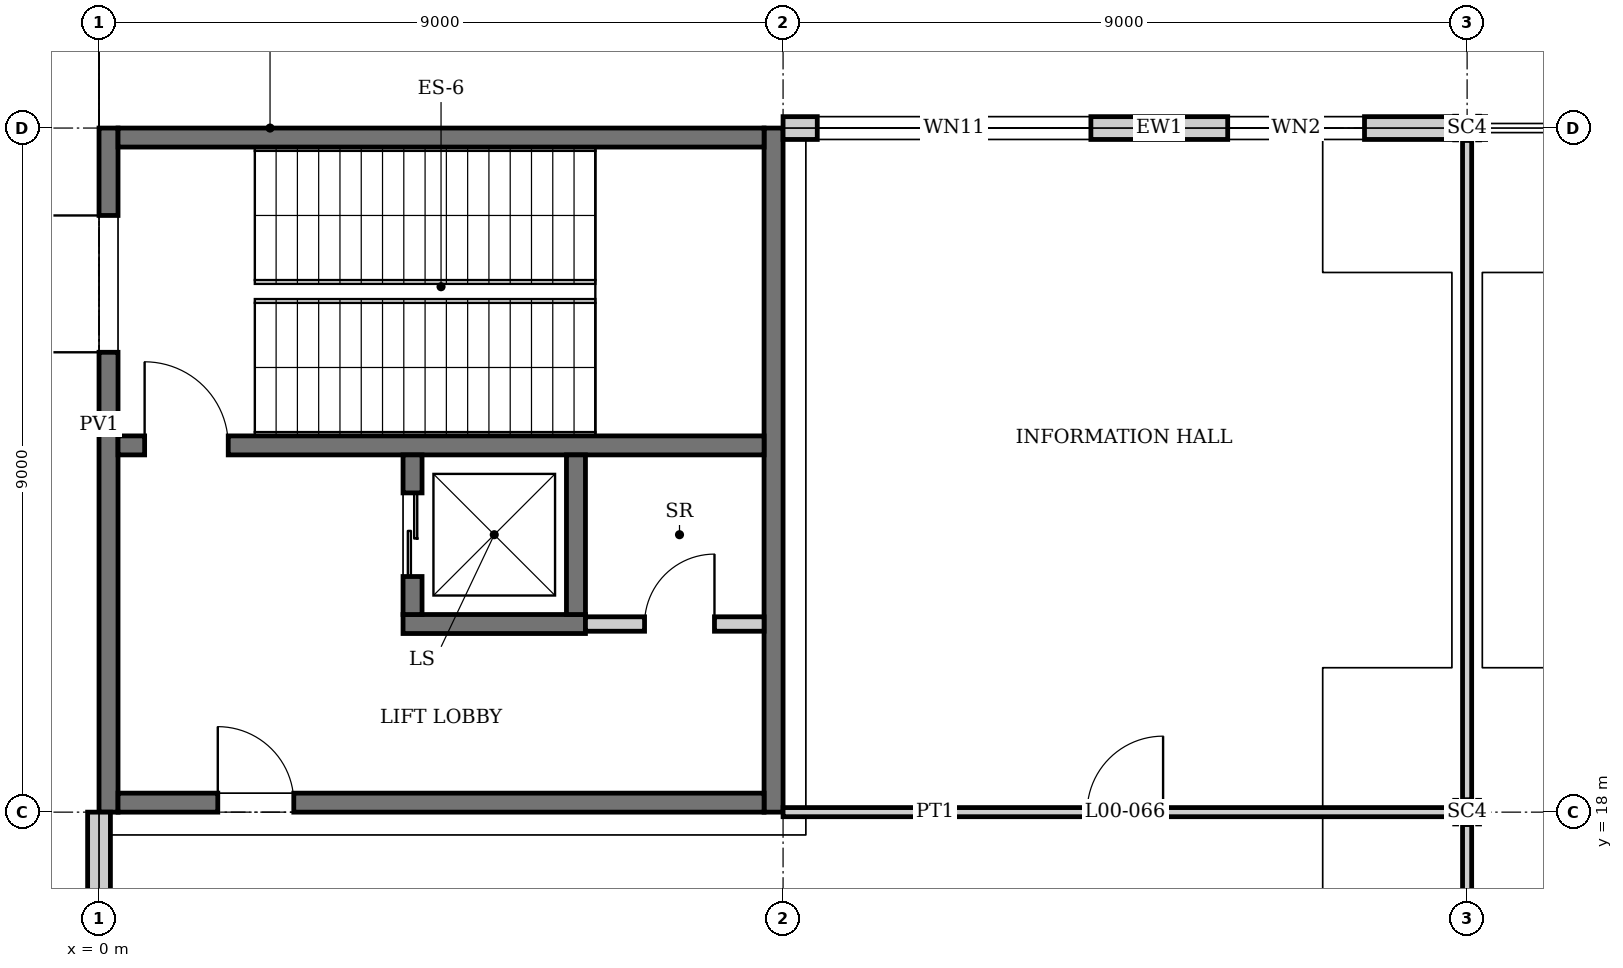
"""IFC4 building model, lengths in metres.
Left out: names, types, materials, properties, quantities, classifications, styles, units other than length and angle.
Written with IfcOpenShell. Run it as: python <this file> out.ifc"""

import sys

from ifc_helpers import new_model, si_unit, direction, frame, frame_2d, origin, origin_2d, place, context, subcontext, project, spatial, rectangle, i_section, extrude, element, fill, save


model = new_model("IFC4")
c1 = context("Model", 3, precision=1e-05, world=origin(), true_north=direction((0.0, 1.0)))
c2 = subcontext(c1, "Body", "Model", "MODEL_VIEW")
j1 = project(units=[si_unit("LENGTHUNIT", "METRE"), si_unit("PLANEANGLEUNIT", "RADIAN")], contexts=[c1])
p1 = place(None, origin())
s1 = spatial("IfcSite", under=j1, at=p1, CompositionType="ELEMENT")
p2 = place(p1, origin())
s2 = spatial("IfcBuilding", under=s1, at=p2, CompositionType="ELEMENT")
p3 = place(p2, origin())
s3 = spatial("IfcBuildingStorey", under=s2, at=p3, CompositionType="ELEMENT", Elevation=0.0)
for number, where, z_axis, x_axis in (
    (1, (18.0, 18.0, 0.0), (0.0, 0.0, 1.0), (0.0, 1.0, 0.0)),
    (2, (18.0, 27.0, 0.0), (0.0, 0.0, 1.0), (0.0, 1.0, 0.0)),
):
    element("IfcColumn", number, at=place(p3, frame(where, z_axis=z_axis, x_axis=x_axis)), inside=s3, PredefinedType="COLUMN", context=c2, shape_type="SweptSolid", body=[
        extrude(i_section(OverallWidth=0.311, OverallDepth=0.327, WebThickness=0.016, FlangeThickness=0.025, at=origin_2d()), origin(), (0.0, 0.0, 1.0), 6.0),
    ])
p4 = place(p3, frame((0.125, 18.0, 0.0), z_axis=(0.0, 0.0, 1.0), x_axis=(0.0, 1.0, 0.0)))
e3 = element("IfcWall", 3, at=p4, inside=s3, PredefinedType="SHEAR", context=c2, shape_type="SweptSolid", body=[
    extrude(rectangle(XDim=9.0, YDim=0.25, at=frame_2d((4.5, 0.0))), origin(), (0.0, 0.0, 1.0), 6.0),
])
p5 = place(p4, frame((6.05, 0.0, 0.0)))
e4 = element("IfcOpeningElement", 4, at=p5, cuts=e3, PredefinedType="OPENING", context=c2, shape_type="SweptSolid", body=[
    extrude(rectangle(XDim=1.8, YDim=2.4, at=frame_2d((0.9, 1.2))), frame((0.0, 0.135, 0.0), z_axis=(0.0, -1.0, 0.0), x_axis=(1.0, 0.0, 0.0)), (0.0, 0.0, 1.0), 0.27),
])
p6 = place(p3, frame((8.875, 18.0, 0.0), z_axis=(0.0, 0.0, 1.0), x_axis=(0.0, 1.0, 0.0)))
e5 = element("IfcWall", 5, at=p6, inside=s3, PredefinedType="SHEAR", context=c2, shape_type="SweptSolid", body=[
    extrude(rectangle(XDim=9.0, YDim=0.25, at=frame_2d((4.5, 0.0))), origin(), (0.0, 0.0, 1.0), 6.0),
])
p7 = place(p3, frame((0.25, 18.125, 0.0), z_axis=(0.0, 0.0, 1.0), x_axis=(1.0, 0.0, 0.0)))
e6 = element("IfcWall", 6, at=p7, inside=s3, PredefinedType="SHEAR", context=c2, shape_type="SweptSolid", body=[
    extrude(rectangle(XDim=8.5, YDim=0.25, at=frame_2d((4.25, 0.0))), origin(), (0.0, 0.0, 1.0), 6.0),
])
p8 = place(p7, frame((1.312, 0.0, 0.0)))
e7 = element("IfcOpeningElement", 7, at=p8, cuts=e6, PredefinedType="OPENING", context=c2, shape_type="SweptSolid", body=[
    extrude(rectangle(XDim=1.0, YDim=2.1, at=frame_2d((0.5, 1.05))), frame((0.0, 0.135, 0.0), z_axis=(0.0, -1.0, 0.0), x_axis=(1.0, 0.0, 0.0)), (0.0, 0.0, 1.0), 0.27),
])
p9 = place(p3, frame((0.25, 26.875, 0.0), z_axis=(0.0, 0.0, 1.0), x_axis=(1.0, 0.0, 0.0)))
e8 = element("IfcWall", 8, at=p9, inside=s3, PredefinedType="SHEAR", context=c2, shape_type="SweptSolid", body=[
    extrude(rectangle(XDim=8.5, YDim=0.25, at=frame_2d((4.25, 0.0))), origin(), (0.0, 0.0, 1.0), 6.0),
])
p10 = place(p3, frame((9.0, 27.0, 0.0), z_axis=(0.0, 0.0, 1.0), x_axis=(1.0, 0.0, 0.0)))
e9 = element("IfcWall", 9, at=p10, inside=s3, PredefinedType="SOLIDWALL", context=c2, shape_type="SweptSolid", body=[
    extrude(rectangle(XDim=8.836, YDim=0.3, at=frame_2d((4.418, 0.0))), origin(), (0.0, 0.0, 1.0), 5.444),
])
p11 = place(p10, frame((0.45, 0.0, 0.3)))
e10 = element("IfcOpeningElement", 10, at=p11, cuts=e9, PredefinedType="OPENING", context=c2, shape_type="SweptSolid", body=[
    extrude(rectangle(XDim=3.6, YDim=3.0, at=frame_2d((1.8, 1.5))), frame((0.0, 0.16, 0.0), z_axis=(0.0, -1.0, 0.0), x_axis=(1.0, 0.0, 0.0)), (0.0, 0.0, 1.0), 0.32),
])
p12 = place(p10, frame((5.85, 0.0, 0.6)))
e11 = element("IfcOpeningElement", 11, at=p12, cuts=e9, PredefinedType="OPENING", context=c2, shape_type="SweptSolid", body=[
    extrude(rectangle(XDim=1.8, YDim=3.0, at=frame_2d((0.9, 1.5))), frame((0.0, 0.16, 0.0), z_axis=(0.0, -1.0, 0.0), x_axis=(1.0, 0.0, 0.0)), (0.0, 0.0, 1.0), 0.32),
])
p13 = place(p3, frame((0.0, 9.154, 0.0), z_axis=(0.0, 0.0, 1.0), x_axis=(0.0, 1.0, 0.0)))
e12 = element("IfcWall", 12, at=p13, inside=s3, PredefinedType="SOLIDWALL", context=c2, shape_type="SweptSolid", body=[
    extrude(rectangle(XDim=8.846, YDim=0.3, at=frame_2d((4.423, 0.0))), origin(), (0.0, 0.0, 1.0), 5.444),
])
p14 = place(p13, frame((0.896, 0.0, 0.0)))
e13 = element("IfcOpeningElement", 13, at=p14, cuts=e12, PredefinedType="OPENING", context=c2, shape_type="SweptSolid", body=[
    extrude(rectangle(XDim=2.4, YDim=2.7, at=frame_2d((1.2, 1.35))), frame((0.0, 0.16, 0.0), z_axis=(0.0, -1.0, 0.0), x_axis=(1.0, 0.0, 0.0)), (0.0, 0.0, 1.0), 0.32),
])
p15 = place(p13, frame((5.396, 0.0, 0.0)))
e14 = element("IfcOpeningElement", 14, at=p15, cuts=e12, PredefinedType="OPENING", context=c2, shape_type="SweptSolid", body=[
    extrude(rectangle(XDim=2.4, YDim=2.7, at=frame_2d((1.2, 1.35))), frame((0.0, 0.16, 0.0), z_axis=(0.0, -1.0, 0.0), x_axis=(1.0, 0.0, 0.0)), (0.0, 0.0, 1.0), 0.32),
])
p16 = place(p3, frame((0.25, 22.825, 0.0), z_axis=(0.0, 0.0, 1.0), x_axis=(1.0, 0.0, 0.0)))
e15 = element("IfcWall", 15, at=p16, inside=s3, PredefinedType="SOLIDWALL", context=c2, shape_type="SweptSolid", body=[
    extrude(rectangle(XDim=8.5, YDim=0.25, at=frame_2d((4.25, 0.0))), origin(), (0.0, 0.0, 1.0), 5.75),
])
p17 = place(p16, frame((0.35, 0.0, 0.0)))
e16 = element("IfcOpeningElement", 16, at=p17, cuts=e15, PredefinedType="OPENING", context=c2, shape_type="SweptSolid", body=[
    extrude(rectangle(XDim=1.1, YDim=2.1, at=frame_2d((0.55, 1.05))), frame((0.0, 0.135, 0.0), z_axis=(0.0, -1.0, 0.0), x_axis=(1.0, 0.0, 0.0)), (0.0, 0.0, 1.0), 0.27),
])
p18 = place(p3, frame((4.0, 20.475, -1.4), z_axis=(0.0, 0.0, 1.0), x_axis=(1.0, 0.0, 0.0)))
e17 = element("IfcWall", 17, at=p18, inside=s3, PredefinedType="SOLIDWALL", context=c2, shape_type="SweptSolid", body=[
    extrude(rectangle(XDim=2.4, YDim=0.25, at=frame_2d((1.2, 0.0))), origin(), (0.0, 0.0, 1.0), 7.4),
])
p19 = place(p3, frame((4.125, 20.6, -1.4), z_axis=(0.0, 0.0, 1.0), x_axis=(0.0, 1.0, 0.0)))
e18 = element("IfcWall", 18, at=p19, inside=s3, PredefinedType="SOLIDWALL", context=c2, shape_type="SweptSolid", body=[
    extrude(rectangle(XDim=2.1, YDim=0.25, at=frame_2d((1.05, 0.0))), origin(), (0.0, 0.0, 1.0), 7.4),
])
p20 = place(p19, frame((0.5, 0.0, 1.4)))
e19 = element("IfcOpeningElement", 19, at=p20, cuts=e18, PredefinedType="OPENING", context=c2, shape_type="SweptSolid", body=[
    extrude(rectangle(XDim=1.1, YDim=2.1, at=frame_2d((0.55, 1.05))), frame((0.0, 0.135, 0.0), z_axis=(0.0, -1.0, 0.0), x_axis=(1.0, 0.0, 0.0)), (0.0, 0.0, 1.0), 0.27),
])
p21 = place(p3, frame((6.275, 20.6, -1.4), z_axis=(0.0, 0.0, 1.0), x_axis=(0.0, 1.0, 0.0)))
e20 = element("IfcWall", 20, at=p21, inside=s3, PredefinedType="SOLIDWALL", context=c2, shape_type="SweptSolid", body=[
    extrude(rectangle(XDim=2.1, YDim=0.25, at=frame_2d((1.05, 0.0))), origin(), (0.0, 0.0, 1.0), 7.4),
])
p22 = place(p3, frame((9.0, 18.0, 0.0), z_axis=(0.0, 0.0, 1.0), x_axis=(1.0, 0.0, 0.0)))
e21 = element("IfcWall", 21, at=p22, inside=s3, PredefinedType="PARTITIONING", context=c2, shape_type="SweptSolid", body=[
    extrude(rectangle(XDim=8.836, YDim=0.12, at=frame_2d((4.418, 0.0))), origin(), (0.0, 0.0, 1.0), 5.322),
])
p23 = place(p22, frame((4.0, 0.0, 0.0)))
e22 = element("IfcOpeningElement", 22, at=p23, cuts=e21, PredefinedType="OPENING", context=c2, shape_type="SweptSolid", body=[
    extrude(rectangle(XDim=1.0, YDim=2.1, at=frame_2d((0.5, 1.05))), frame((0.0, 0.07, 0.0), z_axis=(0.0, -1.0, 0.0), x_axis=(1.0, 0.0, 0.0)), (0.0, 0.0, 1.0), 0.14),
])
p24 = place(p3, frame((6.4, 20.475, 0.0), z_axis=(0.0, 0.0, 1.0), x_axis=(1.0, 0.0, 0.0)))
e23 = element("IfcWall", 23, at=p24, inside=s3, PredefinedType="PARTITIONING", context=c2, shape_type="SweptSolid", body=[
    extrude(rectangle(XDim=2.35, YDim=0.19, at=frame_2d((1.175, 0.0))), origin(), (0.0, 0.0, 1.0), 5.75),
])
p25 = place(p24, frame((0.778, 0.0, 0.0)))
e24 = element("IfcOpeningElement", 24, at=p25, cuts=e23, PredefinedType="OPENING", context=c2, shape_type="SweptSolid", body=[
    extrude(rectangle(XDim=0.92, YDim=2.1, at=frame_2d((0.46, 1.05))), frame((0.0, 0.105, 0.0), z_axis=(0.0, -1.0, 0.0), x_axis=(1.0, 0.0, 0.0)), (0.0, 0.0, 1.0), 0.21),
])
p26 = place(p3, frame((18.0, 9.0, 0.0), z_axis=(0.0, 0.0, 1.0), x_axis=(0.0, 1.0, 0.0)))
e25 = element("IfcWall", 25, at=p26, inside=s3, PredefinedType="PARTITIONING", context=c2, shape_type="SweptSolid", body=[
    extrude(rectangle(XDim=8.836, YDim=0.12, at=frame_2d((4.418, 0.0))), origin(), (0.0, 0.0, 1.0), 5.444),
])
p27 = place(p26, frame((3.3, 0.0, 0.0)))
e26 = element("IfcOpeningElement", 26, at=p27, cuts=e25, PredefinedType="OPENING", context=c2, shape_type="SweptSolid", body=[
    extrude(rectangle(XDim=2.4, YDim=2.4, at=frame_2d((1.2, 1.2))), frame((0.0, 0.07, 0.0), z_axis=(0.0, -1.0, 0.0), x_axis=(1.0, 0.0, 0.0)), (0.0, 0.0, 1.0), 0.14),
])
p28 = place(p3, frame((18.0, 18.164, 0.0), z_axis=(0.0, 0.0, 1.0), x_axis=(0.0, 1.0, 0.0)))
e27 = element("IfcWall", 27, at=p28, inside=s3, PredefinedType="PARTITIONING", context=c2, shape_type="SweptSolid", body=[
    extrude(rectangle(XDim=8.673, YDim=0.12, at=frame_2d((4.336, 0.0))), origin(), (0.0, 0.0, 1.0), 5.444),
])
p29 = place(p11, origin())
e28 = element("IfcWindow", 28, at=p29, inside=s3, PartitioningType="SINGLE_PANEL", PredefinedType="WINDOW", context=c2, shape_type="SweptSolid", body=[
    extrude(rectangle(XDim=3.6, YDim=3.0, at=frame_2d((1.8, 1.5))), frame((0.0, 0.03, 0.0), z_axis=(0.0, -1.0, 0.0), x_axis=(1.0, 0.0, 0.0)), (0.0, 0.0, 1.0), 0.06),
])
fill(e10, e28)
p30 = place(p12, origin())
e29 = element("IfcWindow", 29, at=p30, inside=s3, PartitioningType="SINGLE_PANEL", PredefinedType="WINDOW", context=c2, shape_type="SweptSolid", body=[
    extrude(rectangle(XDim=1.8, YDim=3.0, at=frame_2d((0.9, 1.5))), frame((0.0, 0.03, 0.0), z_axis=(0.0, -1.0, 0.0), x_axis=(1.0, 0.0, 0.0)), (0.0, 0.0, 1.0), 0.06),
])
fill(e11, e29)
p31 = place(p5, origin())
e30 = element("IfcDoor", 30, at=p31, inside=s3, OperationType="DOUBLE_DOOR_SINGLE_SWING", PredefinedType="DOOR", context=c2, shape_type="SweptSolid", body=[
    extrude(rectangle(XDim=1.8, YDim=2.4, at=frame_2d((0.9, 1.2))), frame((0.0, 0.025, 0.0), z_axis=(0.0, -1.0, 0.0), x_axis=(1.0, 0.0, 0.0)), (0.0, 0.0, 1.0), 0.05),
])
fill(e4, e30)
p32 = place(p20, origin())
e31 = element("IfcDoor", 31, at=p32, inside=s3, OperationType="DOUBLE_DOOR_SLIDING", PredefinedType="DOOR", context=c2, shape_type="SweptSolid", body=[
    extrude(rectangle(XDim=1.1, YDim=2.1, at=frame_2d((0.55, 1.05))), frame((0.0, 0.025, 0.0), z_axis=(0.0, -1.0, 0.0), x_axis=(1.0, 0.0, 0.0)), (0.0, 0.0, 1.0), 0.05),
])
fill(e19, e31)
p33 = place(p23, origin())
e32 = element("IfcDoor", 32, at=p33, inside=s3, OperationType="SINGLE_SWING_RIGHT", PredefinedType="DOOR", context=c2, shape_type="SweptSolid", body=[
    extrude(rectangle(XDim=1.0, YDim=2.1, at=frame_2d((0.5, 1.05))), frame((0.0, 0.025, 0.0), z_axis=(0.0, -1.0, 0.0), x_axis=(1.0, 0.0, 0.0)), (0.0, 0.0, 1.0), 0.05),
])
fill(e22, e32)
p34 = place(p17, origin())
e33 = element("IfcDoor", 33, at=p34, inside=s3, OperationType="SINGLE_SWING_LEFT", PredefinedType="DOOR", context=c2, shape_type="SweptSolid", body=[
    extrude(rectangle(XDim=1.1, YDim=2.1, at=frame_2d((0.55, 1.05))), frame((0.0, 0.025, 0.0), z_axis=(0.0, -1.0, 0.0), x_axis=(1.0, 0.0, 0.0)), (0.0, 0.0, 1.0), 0.05),
])
fill(e16, e33)
p35 = place(p8, origin())
e34 = element("IfcDoor", 34, at=p35, inside=s3, OperationType="SINGLE_SWING_LEFT", PredefinedType="DOOR", context=c2, shape_type="SweptSolid", body=[
    extrude(rectangle(XDim=1.0, YDim=2.1, at=frame_2d((0.5, 1.05))), frame((0.0, 0.025, 0.0), z_axis=(0.0, -1.0, 0.0), x_axis=(1.0, 0.0, 0.0)), (0.0, 0.0, 1.0), 0.05),
])
fill(e7, e34)
p36 = place(p25, origin())
e35 = element("IfcDoor", 35, at=p36, inside=s3, OperationType="SINGLE_SWING_RIGHT", PredefinedType="DOOR", context=c2, shape_type="SweptSolid", body=[
    extrude(rectangle(XDim=0.92, YDim=2.1, at=frame_2d((0.46, 1.05))), frame((0.0, 0.025, 0.0), z_axis=(0.0, -1.0, 0.0), x_axis=(1.0, 0.0, 0.0)), (0.0, 0.0, 1.0), 0.05),
])
fill(e24, e35)
save(model, sys.argv[1])
